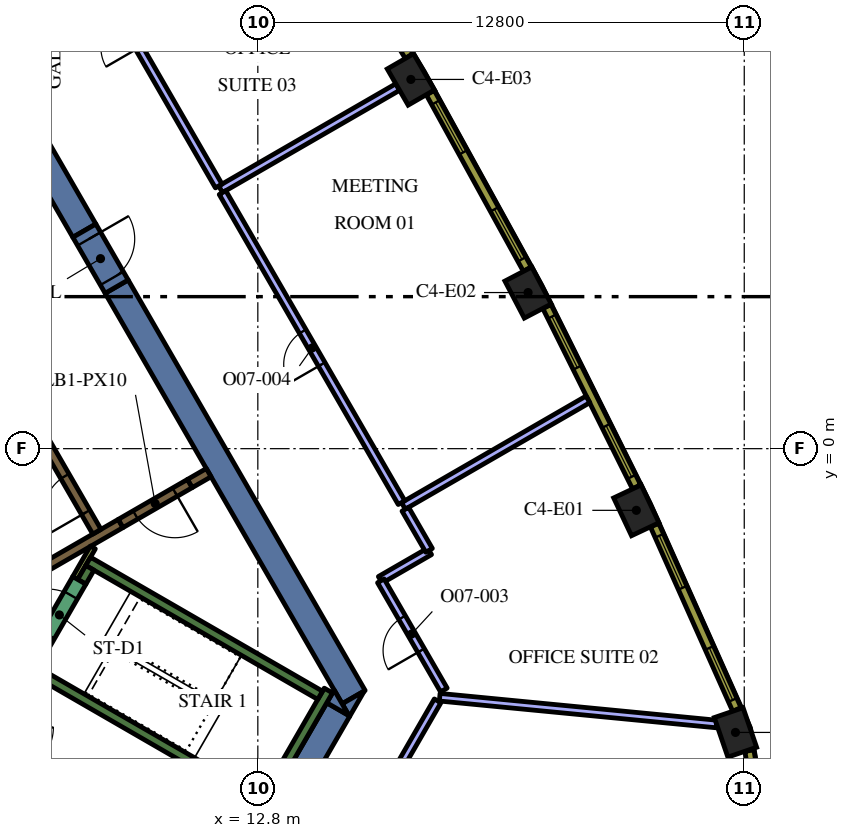
"""IFC4 building model, lengths in metres.
Left out: names, types, materials, properties, quantities, classifications, styles, units other than length and angle.
Written with IfcOpenShell. Run it as: python <this file> out.ifc"""

import sys

from ifc_helpers import new_model, si_unit, direction, frame, frame_2d, origin, origin_2d, place, context, subcontext, project, spatial, polyline, rectangle, outline, extrude, element, fill, save


model = new_model("IFC4")
c1 = context("Model", 3, precision=1e-05, world=origin(), true_north=direction((0.0, 1.0)))
c2 = subcontext(c1, "Body", "Model", "MODEL_VIEW")
j1 = project(units=[si_unit("LENGTHUNIT", "METRE"), si_unit("PLANEANGLEUNIT", "RADIAN")], contexts=[c1])
p1 = place(None, origin())
s1 = spatial("IfcSite", under=j1, at=p1, CompositionType="ELEMENT")
p2 = place(p1, origin())
s2 = spatial("IfcBuilding", under=s1, at=p2, CompositionType="ELEMENT")
p3 = place(p2, frame((0.0, 0.0, 218.4)))
s3 = spatial("IfcBuildingStorey", under=s2, at=p3, CompositionType="ELEMENT", Elevation=218.4)
for number, where, z_axis, x_axis in (
    (1, (25.369, -7.466, 0.0), (0.0, 0.0, 1.0), (-0.324, 0.946, 0.0)),
    (2, (22.76, -1.623, 0.0), (0.0, 0.0, 1.0), (-0.426, 0.905, 0.0)),
    (3, (19.912, 4.108, 0.0), (0.0, 0.0, 1.0), (-0.464, 0.886, 0.0)),
    (4, (16.827, 9.715, 0.0), (0.0, 0.0, 1.0), (-0.5, 0.866, 0.0)),
):
    element("IfcColumn", number, at=place(p3, frame(where, z_axis=z_axis, x_axis=x_axis)), inside=s3, PredefinedType="COLUMN", context=c2, shape_type="SweptSolid", body=[
        extrude(rectangle(XDim=1.1, YDim=0.8, at=origin_2d()), origin(), (0.0, 0.0, 1.0), 4.2),
    ])
p4 = place(p3, frame((9.085, 4.264, 0.0), z_axis=(0.0, 0.0, 1.0), x_axis=(0.499998082512, -0.866026510844, 0.0)))
e5 = element("IfcWall", 5, at=p4, inside=s3, PredefinedType="SOLIDWALL", context=c2, shape_type="SweptSolid", body=[
    extrude(rectangle(XDim=12.472, YDim=0.7, at=frame_2d((6.236, 0.0))), origin(), (0.0, 0.0, 1.0), 4.2),
])
p5 = place(p3, origin())
e6 = element("IfcWall", 6, at=p5, inside=s3, PredefinedType="SOLIDWALL", context=c2, shape_type="SweptSolid", body=[
    extrude(outline(polyline([(15.213, -7.05), (15.019, -6.714), (15.601, -6.378), (15.213, -7.05)])), origin(), (0.0, 0.0, 1.0), 4.2),
])
p6 = place(p3, frame((13.003, -10.179, 0.0), z_axis=(0.0, 0.0, 1.0), x_axis=(0.499972675833, 0.866041178825, 0.0)))
e7 = element("IfcWall", 7, at=p6, inside=s3, PredefinedType="SOLIDWALL", context=c2, shape_type="SweptSolid", body=[
    extrude(rectangle(XDim=3.829, YDim=0.7, at=frame_2d((1.915, 0.0))), origin(), (0.0, 0.0, 1.0), 4.2),
])
e8 = element("IfcWall", 8, at=p5, inside=s3, PredefinedType="SOLIDWALL", context=c2, shape_type="SweptSolid", body=[
    extrude(outline(polyline([(14.809, -6.35), (15.197, -7.022), (14.615, -6.686), (14.809, -6.35)])), origin(), (0.0, 0.0, 1.0), 4.2),
])
p7 = place(p3, frame((5.571, 10.35, 0.0), z_axis=(0.0, 0.0, 1.0), x_axis=(0.499968379186, -0.8660436593, 0.0)))
e9 = element("IfcWall", 9, at=p7, inside=s3, PredefinedType="SOLIDWALL", context=c2, shape_type="SweptSolid", body=[
    extrude(rectangle(XDim=5.328, YDim=0.7, at=frame_2d((2.664, 0.0))), origin(), (0.0, 0.0, 1.0), 4.2),
])
p8 = place(p3, frame((12.84, -9.511, 0.0), z_axis=(0.0, 0.0, 1.0), x_axis=(0.500048121057, 0.865997619297, 0.0)))
e10 = element("IfcWall", 10, at=p8, inside=s3, PredefinedType="SOLIDWALL", context=c2, shape_type="SweptSolid", body=[
    extrude(rectangle(XDim=3.634, YDim=0.25, at=frame_2d((1.817, 0.0))), origin(), (0.0, 0.0, 1.0), 4.2),
])
p9 = place(p3, frame((12.84, -9.261, 0.0), z_axis=(0.0, 0.0, 1.0), x_axis=(-0.866013990052, 0.500019768644, 0.0)))
e11 = element("IfcWall", 11, at=p9, inside=s3, PredefinedType="SOLIDWALL", context=c2, shape_type="SweptSolid", body=[
    extrude(rectangle(XDim=6.8, YDim=0.25, at=frame_2d((3.4, 0.0))), origin(), (0.0, 0.0, 1.0), 4.2),
])
p10 = place(p3, frame((8.334, -2.964, 0.0), z_axis=(0.0, 0.0, 1.0), x_axis=(0.866016039709, -0.500016218704, 0.0)))
e12 = element("IfcWall", 12, at=p10, inside=s3, PredefinedType="SOLIDWALL", context=c2, shape_type="SweptSolid", body=[
    extrude(rectangle(XDim=7.05, YDim=0.25, at=frame_2d((3.525, 0.0))), origin(), (0.0, 0.0, 1.0), 4.2),
])
p11 = place(p3, frame((8.168, -3.503, 0.0), z_axis=(0.0, 0.0, 1.0), x_axis=(0.49972245349, 0.866185586049, 0.0)))
e13 = element("IfcWall", 13, at=p11, inside=s3, PredefinedType="SOLIDWALL", context=c2, shape_type="SweptSolid", body=[
    extrude(rectangle(XDim=0.425, YDim=0.25, at=frame_2d((0.212, 0.0))), origin(), (0.0, 0.0, 1.0), 4.2),
])
p12 = place(p3, frame((9.19, -1.969, 0.0), z_axis=(0.0, 0.0, 1.0), x_axis=(-0.866057109641, -0.499945079824, 0.0)))
e14 = element("IfcWall", 14, at=p12, inside=s3, PredefinedType="SOLIDWALL", context=c2, shape_type="SweptSolid", body=[
    extrude(rectangle(XDim=3.291, YDim=0.25, at=frame_2d((1.646, 0.0))), origin(), (0.0, 0.0, 1.0), 4.2),
])
p13 = place(p3, frame((11.507, -0.631, 0.0), z_axis=(0.0, 0.0, 1.0), x_axis=(-0.866093731455, -0.499881634324, 0.0)))
e15 = element("IfcWall", 15, at=p13, inside=s3, PredefinedType="SOLIDWALL", context=c2, shape_type="SweptSolid", body=[
    extrude(rectangle(XDim=0.575, YDim=0.25, at=frame_2d((0.288, 0.0))), origin(), (0.0, 0.0, 1.0), 4.2),
])
p14 = place(p3, frame((8.459, -2.599, 0.0), z_axis=(0.0, 0.0, 1.0), x_axis=(-0.500041054325, -0.866001699761, 0.0)))
e16 = element("IfcWall", 16, at=p14, inside=s3, PredefinedType="PARTITIONING", context=c2, shape_type="SweptSolid", body=[
    extrude(rectangle(XDim=0.929, YDim=0.15, at=frame_2d((0.464, 0.0))), origin(), (0.0, 0.0, 1.0), 4.2),
])
p15 = place(p3, frame((8.565, -2.185, 0.0), z_axis=(0.0, 0.0, 1.0), x_axis=(-0.499997954832, 0.866026584559, 0.0)))
e17 = element("IfcWall", 17, at=p15, inside=s3, PredefinedType="SOLIDWALL", context=c2, shape_type="SweptSolid", body=[
    extrude(rectangle(XDim=12.35, YDim=0.25, at=frame_2d((6.175, 0.0))), origin(), (0.0, 0.0, 1.0), 4.2),
])
p16 = place(p15, frame((0.585, 0.0, 0.0)))
e18 = element("IfcOpeningElement", 18, at=p16, cuts=e17, PredefinedType="OPENING", context=c2, shape_type="SweptSolid", body=[
    extrude(rectangle(XDim=1.1, YDim=2.1, at=frame_2d((0.55, 1.05))), frame((0.0, 0.135, 0.0), z_axis=(0.0, -1.0, 0.0), x_axis=(1.0, 0.0, 0.0)), (0.0, 0.0, 1.0), 0.27),
])
p17 = place(p3, frame((7.053, -5.284, 0.0), z_axis=(0.0, 0.0, 1.0), x_axis=(0.500078061341, 0.865980330357, 0.0)))
e19 = element("IfcWall", 19, at=p17, inside=s3, PredefinedType="SOLIDWALL", context=c2, shape_type="SweptSolid", body=[
    extrude(rectangle(XDim=2.1, YDim=0.4, at=frame_2d((1.05, 0.0))), origin(), (0.0, 0.0, 1.0), 4.2),
])
p18 = place(p17, frame((0.45, 0.0, 0.0)))
e20 = element("IfcOpeningElement", 20, at=p18, cuts=e19, PredefinedType="OPENING", context=c2, shape_type="SweptSolid", body=[
    extrude(rectangle(XDim=1.2, YDim=2.1, at=frame_2d((0.6, 1.05))), frame((0.0, 0.21, 0.0), z_axis=(0.0, -1.0, 0.0), x_axis=(1.0, 0.0, 0.0)), (0.0, 0.0, 1.0), 0.42),
])
p19 = place(p3, frame((11.009, -0.919, 0.0), z_axis=(0.0, 0.0, 1.0), x_axis=(-0.866059744384, -0.49994051562, 0.0)))
e21 = element("IfcWall", 21, at=p19, inside=s3, PredefinedType="SOLIDWALL", context=c2, shape_type="SweptSolid", body=[
    extrude(rectangle(XDim=2.1, YDim=0.25, at=frame_2d((1.05, 0.0))), origin(), (0.0, 0.0, 1.0), 4.2),
])
p20 = place(p19, frame((0.45, 0.0, 0.0)))
e22 = element("IfcOpeningElement", 22, at=p20, cuts=e21, PredefinedType="OPENING", context=c2, shape_type="SweptSolid", body=[
    extrude(rectangle(XDim=1.2, YDim=2.1, at=frame_2d((0.6, 1.05))), frame((0.0, 0.135, 0.0), z_axis=(0.0, -1.0, 0.0), x_axis=(1.0, 0.0, 0.0)), (0.0, 0.0, 1.0), 0.27),
])
p21 = place(p3, frame((8.235, 5.736, 0.0), z_axis=(0.0, 0.0, 1.0), x_axis=(0.499954529098, -0.86605165483, 0.0)))
e23 = element("IfcWall", 23, at=p21, inside=s3, PredefinedType="SOLIDWALL", context=c2, shape_type="SweptSolid", body=[
    extrude(rectangle(XDim=1.7, YDim=0.7, at=frame_2d((0.85, 0.0))), origin(), (0.0, 0.0, 1.0), 4.2),
])
p22 = place(p21, frame((0.25, 0.0, 0.0)))
e24 = element("IfcOpeningElement", 24, at=p22, cuts=e23, PredefinedType="OPENING", context=c2, shape_type="SweptSolid", body=[
    extrude(rectangle(XDim=1.2, YDim=2.1, at=frame_2d((0.6, 1.05))), frame((0.0, 0.36, 0.0), z_axis=(0.0, -1.0, 0.0), x_axis=(1.0, 0.0, 0.0)), (0.0, 0.0, 1.0), 0.72),
])
p23 = place(p3, frame((17.586, -6.54, 0.0), z_axis=(0.0, 0.0, 1.0), x_axis=(0.995357542522, -0.096246363795, 0.0)))
e25 = element("IfcWall", 25, at=p23, inside=s3, PredefinedType="PARTITIONING", context=c2, shape_type="SweptSolid", body=[
    extrude(rectangle(XDim=7.318, YDim=0.2, at=frame_2d((3.659, 0.0))), origin(), (0.0, 0.0, 1.0), 3.45),
])
p24 = place(p3, frame((14.362, -12.124, 0.0), z_axis=(0.0, 0.0, 1.0), x_axis=(0.500017005442, 0.866015585465, 0.0)))
e26 = element("IfcWall", 26, at=p24, inside=s3, PredefinedType="PARTITIONING", context=c2, shape_type="SweptSolid", body=[
    extrude(rectangle(XDim=6.338, YDim=0.2, at=frame_2d((3.169, 0.0))), origin(), (0.0, 0.0, 1.0), 3.45),
])
p25 = place(p3, frame((16.631, -1.506, 0.0), z_axis=(0.0, 0.0, 1.0), x_axis=(0.866045655253, 0.499964921787, 0.0)))
e27 = element("IfcWall", 27, at=p25, inside=s3, PredefinedType="PARTITIONING", context=c2, shape_type="SweptSolid", body=[
    extrude(rectangle(XDim=5.607, YDim=0.2, at=frame_2d((2.804, 0.0))), origin(), (0.0, 0.0, 1.0), 3.45),
])
p26 = place(p3, frame((16.022, -3.451, 0.0), z_axis=(0.0, 0.0, 1.0), x_axis=(0.866031096941, 0.499990139034, 0.0)))
e28 = element("IfcWall", 28, at=p26, inside=s3, PredefinedType="PARTITIONING", context=c2, shape_type="SweptSolid", body=[
    extrude(rectangle(XDim=1.5, YDim=0.2, at=frame_2d((0.75, 0.0))), origin(), (0.0, 0.0, 1.0), 3.45),
])
p27 = place(p3, frame((17.306, -2.675, 0.0), z_axis=(0.0, 0.0, 1.0), x_axis=(-0.499919672301, 0.866071776036, 0.0)))
e29 = element("IfcWall", 29, at=p27, inside=s3, PredefinedType="PARTITIONING", context=c2, shape_type="SweptSolid", body=[
    extrude(rectangle(XDim=1.25, YDim=0.2, at=frame_2d((0.625, 0.0))), origin(), (0.0, 0.0, 1.0), 3.45),
])
p28 = place(p3, frame((17.696, -6.35, 0.0), z_axis=(0.0, 0.0, 1.0), x_axis=(-0.500017629075, 0.866015225394, 0.0)))
e30 = element("IfcWall", 30, at=p28, inside=s3, PredefinedType="PARTITIONING", context=c2, shape_type="SweptSolid", body=[
    extrude(rectangle(XDim=3.317, YDim=0.2, at=frame_2d((1.659, 0.0))), origin(), (0.0, 0.0, 1.0), 3.45),
])
p29 = place(p28, frame((1.2, 0.0, 0.0)))
e31 = element("IfcOpeningElement", 31, at=p29, cuts=e30, PredefinedType="OPENING", context=c2, shape_type="SweptSolid", body=[
    extrude(rectangle(XDim=1.0, YDim=2.1, at=frame_2d((0.5, 1.05))), frame((0.0, 0.11, 0.0), z_axis=(0.0, -1.0, 0.0), x_axis=(1.0, 0.0, 0.0)), (0.0, 0.0, 1.0), 0.22),
])
p30 = place(p3, frame((11.821, 6.825, 0.0), z_axis=(0.0, 0.0, 1.0), x_axis=(0.866011792348, 0.500023574959, 0.0)))
e32 = element("IfcWall", 32, at=p30, inside=s3, PredefinedType="PARTITIONING", context=c2, shape_type="SweptSolid", body=[
    extrude(rectangle(XDim=5.381, YDim=0.2, at=frame_2d((2.69, 0.0))), origin(), (0.0, 0.0, 1.0), 3.45),
])
p31 = place(p3, frame((16.581, -1.419, 0.0), z_axis=(0.0, 0.0, 1.0), x_axis=(-0.500019350398, 0.866014231539, 0.0)))
e33 = element("IfcWall", 33, at=p31, inside=s3, PredefinedType="PARTITIONING", context=c2, shape_type="SweptSolid", body=[
    extrude(rectangle(XDim=9.42, YDim=0.2, at=frame_2d((4.71, 0.0))), origin(), (0.0, 0.0, 1.0), 3.45),
])
p32 = place(p31, frame((4.2, 0.0, 0.0)))
e34 = element("IfcOpeningElement", 34, at=p32, cuts=e33, PredefinedType="OPENING", context=c2, shape_type="SweptSolid", body=[
    extrude(rectangle(XDim=1.0, YDim=2.1, at=frame_2d((0.5, 1.05))), frame((0.0, 0.11, 0.0), z_axis=(0.0, -1.0, 0.0), x_axis=(1.0, 0.0, 0.0)), (0.0, 0.0, 1.0), 0.22),
])
p33 = place(p3, frame((11.771, 6.912, 0.0), z_axis=(0.0, 0.0, 1.0), x_axis=(-0.500008127286, 0.866020711443, 0.0)))
e35 = element("IfcWall", 35, at=p33, inside=s3, PredefinedType="PARTITIONING", context=c2, shape_type="SweptSolid", body=[
    extrude(rectangle(XDim=9.42, YDim=0.2, at=frame_2d((4.71, 0.0))), origin(), (0.0, 0.0, 1.0), 3.45),
])
p34 = place(p33, frame((4.2, 0.0, 0.0)))
e36 = element("IfcOpeningElement", 36, at=p34, cuts=e35, PredefinedType="OPENING", context=c2, shape_type="SweptSolid", body=[
    extrude(rectangle(XDim=1.0, YDim=2.1, at=frame_2d((0.5, 1.05))), frame((0.0, 0.11, 0.0), z_axis=(0.0, -1.0, 0.0), x_axis=(1.0, 0.0, 0.0)), (0.0, 0.0, 1.0), 0.22),
])
p35 = place(p3, frame((26.172, -10.517, 0.0), z_axis=(0.0, 0.0, 1.0), x_axis=(-0.167660055546, 0.985844869021, 0.0)))
e37 = element("IfcWall", 37, at=p35, inside=s3, PredefinedType="SOLIDWALL", context=c2, shape_type="SweptSolid", body=[
    extrude(rectangle(XDim=2.609, YDim=0.24, at=frame_2d((1.305, 0.0))), origin(), (0.0, 0.0, 1.0), 3.95),
])
p36 = place(p35, frame((0.805, 0.0, 0.9)))
e38 = element("IfcOpeningElement", 38, at=p36, cuts=e37, PredefinedType="OPENING", context=c2, shape_type="SweptSolid", body=[
    extrude(rectangle(XDim=1.0, YDim=2.55, at=frame_2d((0.5, 1.275))), frame((0.0, 0.13, 0.0), z_axis=(0.0, -1.0, 0.0), x_axis=(1.0, 0.0, 0.0)), (0.0, 0.0, 1.0), 0.26),
])
p37 = place(p3, frame((25.405, -6.861, 0.0), z_axis=(0.0, 0.0, 1.0), x_axis=(-0.407579651789, 0.913169659728, 0.0)))
e39 = element("IfcWall", 39, at=p37, inside=s3, PredefinedType="SOLIDWALL", context=c2, shape_type="SweptSolid", body=[
    extrude(rectangle(XDim=5.311, YDim=0.24, at=frame_2d((2.655, 0.0))), origin(), (0.0, 0.0, 1.0), 3.95),
])
p38 = place(p37, frame((0.271, 0.0, 0.9)))
e40 = element("IfcOpeningElement", 40, at=p38, cuts=e39, PredefinedType="OPENING", context=c2, shape_type="SweptSolid", body=[
    extrude(rectangle(XDim=1.5, YDim=2.55, at=frame_2d((0.75, 1.275))), frame((0.0, 0.13, 0.0), z_axis=(0.0, -1.0, 0.0), x_axis=(1.0, 0.0, 0.0)), (0.0, 0.0, 1.0), 0.26),
])
p39 = place(p37, frame((3.504, 0.0, 0.9)))
e41 = element("IfcOpeningElement", 41, at=p39, cuts=e39, PredefinedType="OPENING", context=c2, shape_type="SweptSolid", body=[
    extrude(rectangle(XDim=1.5, YDim=2.55, at=frame_2d((0.75, 1.275))), frame((0.0, 0.13, 0.0), z_axis=(0.0, -1.0, 0.0), x_axis=(1.0, 0.0, 0.0)), (0.0, 0.0, 1.0), 0.26),
])
p40 = place(p3, frame((22.766, -1.005, 0.0), z_axis=(0.0, 0.0, 1.0), x_axis=(-0.445129582031, 0.895466166419, 0.0)))
e42 = element("IfcWall", 42, at=p40, inside=s3, PredefinedType="SOLIDWALL", context=c2, shape_type="SweptSolid", body=[
    extrude(rectangle(XDim=5.298, YDim=0.24, at=frame_2d((2.649, 0.0))), origin(), (0.0, 0.0, 1.0), 3.95),
])
p41 = place(p40, frame((0.295, 0.0, 0.9)))
e43 = element("IfcOpeningElement", 43, at=p41, cuts=e42, PredefinedType="OPENING", context=c2, shape_type="SweptSolid", body=[
    extrude(rectangle(XDim=1.5, YDim=2.55, at=frame_2d((0.75, 1.275))), frame((0.0, 0.13, 0.0), z_axis=(0.0, -1.0, 0.0), x_axis=(1.0, 0.0, 0.0)), (0.0, 0.0, 1.0), 0.26),
])
p42 = place(p40, frame((3.504, 0.0, 0.9)))
e44 = element("IfcOpeningElement", 44, at=p42, cuts=e42, PredefinedType="OPENING", context=c2, shape_type="SweptSolid", body=[
    extrude(rectangle(XDim=1.5, YDim=2.55, at=frame_2d((0.75, 1.275))), frame((0.0, 0.13, 0.0), z_axis=(0.0, -1.0, 0.0), x_axis=(1.0, 0.0, 0.0)), (0.0, 0.0, 1.0), 0.26),
])
p43 = place(p3, frame((19.892, 4.725, 0.0), z_axis=(0.0, 0.0, 1.0), x_axis=(-0.481925825015, 0.876212017256, 0.0)))
e45 = element("IfcWall", 45, at=p43, inside=s3, PredefinedType="SOLIDWALL", context=c2, shape_type="SweptSolid", body=[
    extrude(rectangle(XDim=5.299, YDim=0.24, at=frame_2d((2.649, 0.0))), origin(), (0.0, 0.0, 1.0), 3.95),
])
p44 = place(p43, frame((0.295, 0.0, 0.9)))
e46 = element("IfcOpeningElement", 46, at=p44, cuts=e45, PredefinedType="OPENING", context=c2, shape_type="SweptSolid", body=[
    extrude(rectangle(XDim=1.5, YDim=2.55, at=frame_2d((0.75, 1.275))), frame((0.0, 0.13, 0.0), z_axis=(0.0, -1.0, 0.0), x_axis=(1.0, 0.0, 0.0)), (0.0, 0.0, 1.0), 0.26),
])
p45 = place(p43, frame((3.504, 0.0, 0.9)))
e47 = element("IfcOpeningElement", 47, at=p45, cuts=e45, PredefinedType="OPENING", context=c2, shape_type="SweptSolid", body=[
    extrude(rectangle(XDim=1.5, YDim=2.55, at=frame_2d((0.75, 1.275))), frame((0.0, 0.13, 0.0), z_axis=(0.0, -1.0, 0.0), x_axis=(1.0, 0.0, 0.0)), (0.0, 0.0, 1.0), 0.26),
])
p46 = place(p3, frame((16.782, 10.331, 0.0), z_axis=(0.0, 0.0, 1.0), x_axis=(-0.517846166225, 0.855473756538, 0.0)))
e48 = element("IfcWall", 48, at=p46, inside=s3, PredefinedType="SOLIDWALL", context=c2, shape_type="SweptSolid", body=[
    extrude(rectangle(XDim=5.298, YDim=0.24, at=frame_2d((2.649, 0.0))), origin(), (0.0, 0.0, 1.0), 3.95),
])
p47 = place(p46, frame((0.294, 0.0, 0.9)))
e49 = element("IfcOpeningElement", 49, at=p47, cuts=e48, PredefinedType="OPENING", context=c2, shape_type="SweptSolid", body=[
    extrude(rectangle(XDim=1.5, YDim=2.55, at=frame_2d((0.75, 1.275))), frame((0.0, 0.13, 0.0), z_axis=(0.0, -1.0, 0.0), x_axis=(1.0, 0.0, 0.0)), (0.0, 0.0, 1.0), 0.26),
])
p48 = place(p46, frame((3.504, 0.0, 0.9)))
e50 = element("IfcOpeningElement", 50, at=p48, cuts=e48, PredefinedType="OPENING", context=c2, shape_type="SweptSolid", body=[
    extrude(rectangle(XDim=1.5, YDim=2.55, at=frame_2d((0.75, 1.275))), frame((0.0, 0.13, 0.0), z_axis=(0.0, -1.0, 0.0), x_axis=(1.0, 0.0, 0.0)), (0.0, 0.0, 1.0), 0.26),
])
p49 = place(p16, origin())
e51 = element("IfcDoor", 51, at=p49, inside=s3, OperationType="DOUBLE_DOOR_SLIDING", PredefinedType="DOOR", context=c2, shape_type="SweptSolid", body=[
    extrude(rectangle(XDim=1.1, YDim=2.1, at=frame_2d((0.55, 1.05))), frame((0.0, 0.025, 0.0), z_axis=(0.0, -1.0, 0.0), x_axis=(1.0, 0.0, 0.0)), (0.0, 0.0, 1.0), 0.05),
])
fill(e18, e51)
p50 = place(p18, origin())
e52 = element("IfcDoor", 52, at=p50, inside=s3, OperationType="SINGLE_SWING_LEFT", PredefinedType="DOOR", context=c2, shape_type="SweptSolid", body=[
    extrude(rectangle(XDim=1.2, YDim=2.1, at=frame_2d((0.6, 1.05))), frame((0.0, 0.025, 0.0), z_axis=(0.0, -1.0, 0.0), x_axis=(1.0, 0.0, 0.0)), (0.0, 0.0, 1.0), 0.05),
])
fill(e20, e52)
p51 = place(p20, origin())
e53 = element("IfcDoor", 53, at=p51, inside=s3, OperationType="SINGLE_SWING_LEFT", PredefinedType="DOOR", context=c2, shape_type="SweptSolid", body=[
    extrude(rectangle(XDim=1.2, YDim=2.1, at=frame_2d((0.6, 1.05))), frame((0.0, 0.025, 0.0), z_axis=(0.0, -1.0, 0.0), x_axis=(1.0, 0.0, 0.0)), (0.0, 0.0, 1.0), 0.05),
])
fill(e22, e53)
p52 = place(p22, origin())
e54 = element("IfcDoor", 54, at=p52, inside=s3, OperationType="SINGLE_SWING_LEFT", PredefinedType="DOOR", context=c2, shape_type="SweptSolid", body=[
    extrude(rectangle(XDim=1.2, YDim=2.1, at=frame_2d((0.6, 1.05))), frame((0.0, 0.025, 0.0), z_axis=(0.0, -1.0, 0.0), x_axis=(1.0, 0.0, 0.0)), (0.0, 0.0, 1.0), 0.05),
])
fill(e24, e54)
p53 = place(p29, origin())
e55 = element("IfcDoor", 55, at=p53, inside=s3, OperationType="SINGLE_SWING_RIGHT", PredefinedType="DOOR", context=c2, shape_type="SweptSolid", body=[
    extrude(rectangle(XDim=1.0, YDim=2.1, at=frame_2d((0.5, 1.05))), frame((0.0, 0.025, 0.0), z_axis=(0.0, -1.0, 0.0), x_axis=(1.0, 0.0, 0.0)), (0.0, 0.0, 1.0), 0.05),
])
fill(e31, e55)
p54 = place(p32, origin())
e56 = element("IfcDoor", 56, at=p54, inside=s3, OperationType="SINGLE_SWING_LEFT", PredefinedType="DOOR", context=c2, shape_type="SweptSolid", body=[
    extrude(rectangle(XDim=1.0, YDim=2.1, at=frame_2d((0.5, 1.05))), frame((0.0, 0.025, 0.0), z_axis=(0.0, -1.0, 0.0), x_axis=(1.0, 0.0, 0.0)), (0.0, 0.0, 1.0), 0.05),
])
fill(e34, e56)
p55 = place(p38, origin())
e57 = element("IfcWindow", 57, at=p55, inside=s3, PartitioningType="SINGLE_PANEL", PredefinedType="WINDOW", context=c2, shape_type="SweptSolid", body=[
    extrude(rectangle(XDim=1.5, YDim=2.55, at=frame_2d((0.75, 1.275))), frame((0.0, 0.04, 0.0), z_axis=(0.0, -1.0, 0.0), x_axis=(1.0, 0.0, 0.0)), (0.0, 0.0, 1.0), 0.06),
])
fill(e40, e57)
p56 = place(p39, origin())
e58 = element("IfcWindow", 58, at=p56, inside=s3, PartitioningType="SINGLE_PANEL", PredefinedType="WINDOW", context=c2, shape_type="SweptSolid", body=[
    extrude(rectangle(XDim=1.5, YDim=2.55, at=frame_2d((0.75, 1.275))), frame((0.0, 0.04, 0.0), z_axis=(0.0, -1.0, 0.0), x_axis=(1.0, 0.0, 0.0)), (0.0, 0.0, 1.0), 0.06),
])
fill(e41, e58)
p57 = place(p41, origin())
e59 = element("IfcWindow", 59, at=p57, inside=s3, PartitioningType="SINGLE_PANEL", PredefinedType="WINDOW", context=c2, shape_type="SweptSolid", body=[
    extrude(rectangle(XDim=1.5, YDim=2.55, at=frame_2d((0.75, 1.275))), frame((0.0, 0.04, 0.0), z_axis=(0.0, -1.0, 0.0), x_axis=(1.0, 0.0, 0.0)), (0.0, 0.0, 1.0), 0.06),
])
fill(e43, e59)
p58 = place(p42, origin())
e60 = element("IfcWindow", 60, at=p58, inside=s3, PartitioningType="SINGLE_PANEL", PredefinedType="WINDOW", context=c2, shape_type="SweptSolid", body=[
    extrude(rectangle(XDim=1.5, YDim=2.55, at=frame_2d((0.75, 1.275))), frame((0.0, 0.04, 0.0), z_axis=(0.0, -1.0, 0.0), x_axis=(1.0, 0.0, 0.0)), (0.0, 0.0, 1.0), 0.06),
])
fill(e44, e60)
p59 = place(p44, origin())
e61 = element("IfcWindow", 61, at=p59, inside=s3, PartitioningType="SINGLE_PANEL", PredefinedType="WINDOW", context=c2, shape_type="SweptSolid", body=[
    extrude(rectangle(XDim=1.5, YDim=2.55, at=frame_2d((0.75, 1.275))), frame((0.0, 0.04, 0.0), z_axis=(0.0, -1.0, 0.0), x_axis=(1.0, 0.0, 0.0)), (0.0, 0.0, 1.0), 0.06),
])
fill(e46, e61)
p60 = place(p45, origin())
e62 = element("IfcWindow", 62, at=p60, inside=s3, PartitioningType="SINGLE_PANEL", PredefinedType="WINDOW", context=c2, shape_type="SweptSolid", body=[
    extrude(rectangle(XDim=1.5, YDim=2.55, at=frame_2d((0.75, 1.275))), frame((0.0, 0.04, 0.0), z_axis=(0.0, -1.0, 0.0), x_axis=(1.0, 0.0, 0.0)), (0.0, 0.0, 1.0), 0.06),
])
fill(e47, e62)
save(model, sys.argv[1])
